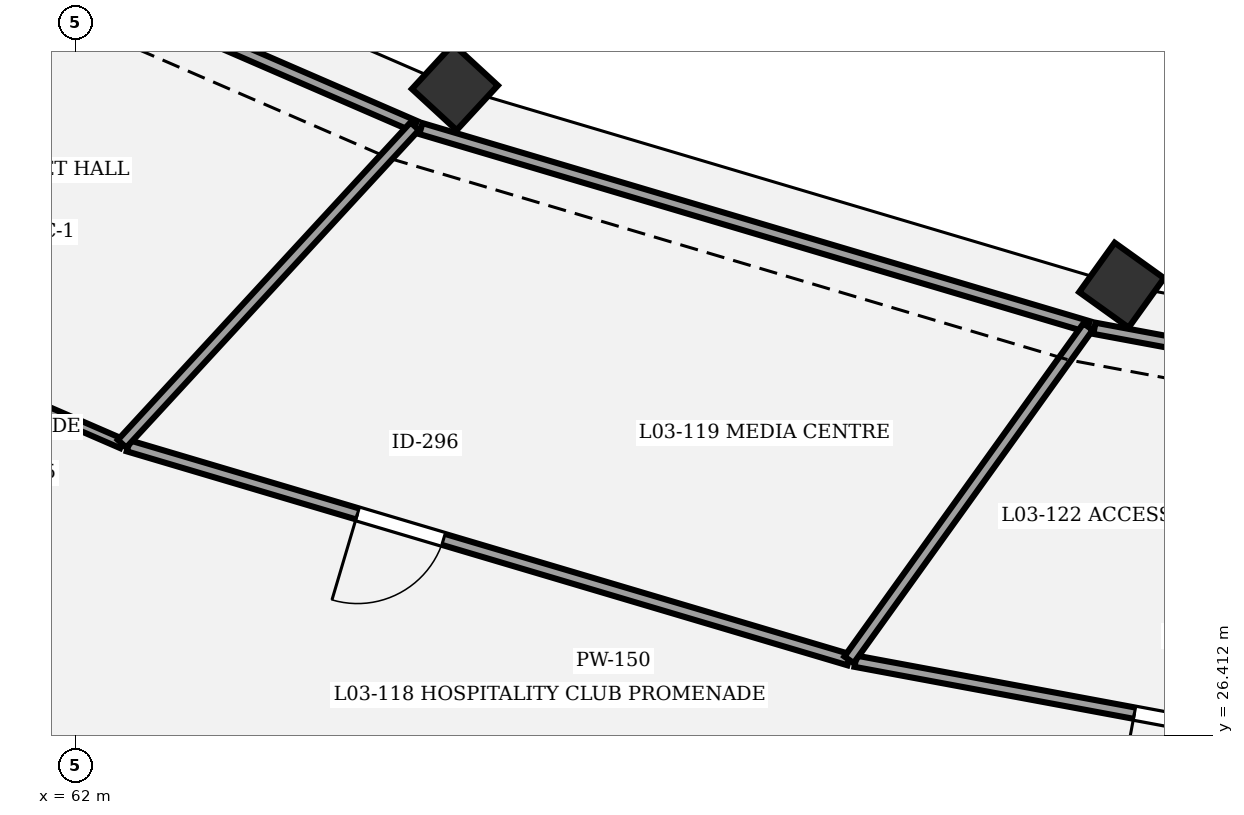
"""IFC4 building model, lengths in metres.
Left out: names, types, materials, properties, quantities, classifications, styles, units other than length and angle.
Written with IfcOpenShell. Run it as: python <this file> out.ifc"""

import sys

from ifc_helpers import new_model, si_unit, direction, frame, frame_2d, origin, origin_2d, place, context, subcontext, project, spatial, rectangle, extrude, element, fill, save


model = new_model("IFC4")
c1 = context("Model", 3, precision=1e-05, world=origin(), true_north=direction((0.0, 1.0)))
c2 = subcontext(c1, "Body", "Model", "MODEL_VIEW")
j1 = project(units=[si_unit("LENGTHUNIT", "METRE"), si_unit("PLANEANGLEUNIT", "RADIAN")], contexts=[c1])
p1 = place(None, origin())
s1 = spatial("IfcSite", under=j1, at=p1, CompositionType="ELEMENT")
p2 = place(p1, origin())
s2 = spatial("IfcBuilding", under=s1, at=p2, CompositionType="ELEMENT")
p3 = place(p2, frame((0.0, 0.0, 14.7)))
s3 = spatial("IfcBuildingStorey", under=s2, at=p3, CompositionType="ELEMENT", Elevation=14.7)
for number, where, z_axis, x_axis in (
    (1, (66.997, 34.938, 0.0), (0.0, 0.0, 1.0), (-0.678, -0.735, 0.0)),
    (2, (75.77, 32.333, 0.0), (0.0, 0.0, 1.0), (-0.583, -0.812, 0.0)),
):
    element("IfcColumn", number, at=place(p3, frame(where, z_axis=z_axis, x_axis=x_axis)), inside=s3, PredefinedType="COLUMN", context=c2, shape_type="SweptSolid", body=[
        extrude(rectangle(XDim=0.8, YDim=0.8, at=origin_2d()), origin(), (0.0, 0.0, 1.0), 2.85),
    ])
p4 = place(p3, frame((62.618, 30.247, 0.0), z_axis=(0.0, 0.0, 1.0), x_axis=(-0.917494590455, 0.397748257677, 0.0)))
e3 = element("IfcWall", 3, at=p4, inside=s3, PredefinedType="PARTITIONING", context=c2, shape_type="SweptSolid", body=[
    extrude(rectangle(XDim=9.049, YDim=0.125, at=frame_2d((4.525, 0.0))), origin(), (0.0, 0.0, 1.0), 3.25),
])
p5 = place(p4, frame((6.167, 0.0, 0.0)))
e4 = element("IfcOpeningElement", 4, at=p5, cuts=e3, PredefinedType="OPENING", context=c2, shape_type="SweptSolid", body=[
    extrude(rectangle(XDim=1.1, YDim=2.1, at=frame_2d((0.55, 1.05))), frame((0.0, 0.073, 0.0), z_axis=(0.0, -1.0, 0.0), x_axis=(1.0, 0.0, 0.0)), (0.0, 0.0, 1.0), 0.145),
])
p6 = place(p3, frame((72.183, 27.404, 0.0), z_axis=(0.0, 0.0, 1.0), x_axis=(-0.958655809656, 0.284568161629, 0.0)))
e5 = element("IfcWall", 5, at=p6, inside=s3, PredefinedType="PARTITIONING", context=c2, shape_type="SweptSolid", body=[
    extrude(rectangle(XDim=9.891, YDim=0.15, at=frame_2d((4.946, 0.0))), origin(), (0.0, 0.0, 1.0), 3.25),
])
p7 = place(p6, frame((5.566, 0.0, 0.0)))
e6 = element("IfcOpeningElement", 6, at=p7, cuts=e5, PredefinedType="OPENING", context=c2, shape_type="SweptSolid", body=[
    extrude(rectangle(XDim=1.18, YDim=2.1, at=frame_2d((0.59, 1.05))), frame((0.0, 0.085, 0.0), z_axis=(0.0, -1.0, 0.0), x_axis=(1.0, 0.0, 0.0)), (0.0, 0.0, 1.0), 0.17),
])
p8 = place(p3, frame((59.134, 26.35, 0.0), z_axis=(0.0, 0.0, 1.0), x_axis=(0.958661401763, -0.284549322211, 0.0)))
e7 = element("IfcWall", 7, at=p8, inside=s3, PredefinedType="PARTITIONING", context=c2, shape_type="SweptSolid", body=[
    extrude(rectangle(XDim=9.809, YDim=0.125, at=frame_2d((4.904, 0.0))), origin(), (0.0, 0.0, 1.0), 3.25),
])
p9 = place(p8, frame((5.487, 0.0, 0.0)))
e8 = element("IfcOpeningElement", 8, at=p9, cuts=e7, PredefinedType="OPENING", context=c2, shape_type="SweptSolid", body=[
    extrude(rectangle(XDim=1.22, YDim=2.1, at=frame_2d((0.61, 1.05))), frame((0.0, 0.073, 0.0), z_axis=(0.0, -1.0, 0.0), x_axis=(1.0, 0.0, 0.0)), (0.0, 0.0, 1.0), 0.145),
])
p10 = place(p3, frame((77.669, 26.38, 0.0), z_axis=(0.0, 0.0, 1.0), x_axis=(-0.983092857309, 0.183107711217, 0.0)))
e9 = element("IfcWall", 9, at=p10, inside=s3, PredefinedType="PARTITIONING", context=c2, shape_type="SweptSolid", body=[
    extrude(rectangle(XDim=5.493, YDim=0.15, at=frame_2d((2.747, 0.0))), origin(), (0.0, 0.0, 1.0), 3.25),
])
p11 = place(p10, frame((0.5, 0.0, 0.0)))
e10 = element("IfcOpeningElement", 10, at=p11, cuts=e9, PredefinedType="OPENING", context=c2, shape_type="SweptSolid", body=[
    extrude(rectangle(XDim=1.26, YDim=2.1, at=frame_2d((0.63, 1.05))), frame((0.0, 0.085, 0.0), z_axis=(0.0, -1.0, 0.0), x_axis=(1.0, 0.0, 0.0)), (0.0, 0.0, 1.0), 0.17),
])
p12 = place(p3, frame((58.784, 37.756, 0.0), z_axis=(0.0, 0.0, 1.0), x_axis=(0.917493946853, -0.397749742286, 0.0)))
e11 = element("IfcWall", 11, at=p12, inside=s3, PredefinedType="PARTITIONING", context=c2, shape_type="SweptSolid", body=[
    extrude(rectangle(XDim=8.377, YDim=0.15, at=frame_2d((4.188, 0.0))), origin(), (0.0, 0.0, 1.0), 3.25),
])
p13 = place(p3, frame((66.47, 34.424, 0.0), z_axis=(0.0, 0.0, 1.0), x_axis=(-0.677867773629, -0.735183841958, 0.0)))
e12 = element("IfcWall", 12, at=p13, inside=s3, PredefinedType="PARTITIONING", context=c2, shape_type="SweptSolid", body=[
    extrude(rectangle(XDim=5.682, YDim=0.15, at=frame_2d((2.841, 0.0))), origin(), (0.0, 0.0, 1.0), 3.25),
])
p14 = place(p3, frame((66.55, 34.393, 0.0), z_axis=(0.0, 0.0, 1.0), x_axis=(0.958661639872, -0.284548520005, 0.0)))
e13 = element("IfcWall", 13, at=p14, inside=s3, PredefinedType="PARTITIONING", context=c2, shape_type="SweptSolid", body=[
    extrude(rectangle(XDim=9.157, YDim=0.15, at=frame_2d((4.579, 0.0))), origin(), (0.0, 0.0, 1.0), 3.25),
])
p15 = place(p3, frame((75.329, 31.788, 0.0), z_axis=(0.0, 0.0, 1.0), x_axis=(-0.582996203878, -0.812474877313, 0.0)))
e14 = element("IfcWall", 14, at=p15, inside=s3, PredefinedType="PARTITIONING", context=c2, shape_type="SweptSolid", body=[
    extrude(rectangle(XDim=5.395, YDim=0.15, at=frame_2d((2.698, 0.0))), origin(), (0.0, 0.0, 1.0), 3.25),
])
p16 = place(p3, frame((75.412, 31.766, 0.0), z_axis=(0.0, 0.0, 1.0), x_axis=(0.98309178423, -0.183113472412, 0.0)))
e15 = element("IfcWall", 15, at=p16, inside=s3, PredefinedType="PARTITIONING", context=c2, shape_type="SweptSolid", body=[
    extrude(rectangle(XDim=2.296, YDim=0.15, at=frame_2d((1.148, 0.0))), origin(), (0.0, 0.0, 1.0), 3.25),
])
p17 = place(p7, origin())
e16 = element("IfcDoor", 16, at=p17, inside=s3, OperationType="SINGLE_SWING_RIGHT", PredefinedType="DOOR", context=c2, shape_type="SweptSolid", body=[
    extrude(rectangle(XDim=1.18, YDim=2.1, at=frame_2d((0.59, 1.05))), frame((0.0, 0.025, 0.0), z_axis=(0.0, -1.0, 0.0), x_axis=(1.0, 0.0, 0.0)), (0.0, 0.0, 1.0), 0.05),
])
fill(e6, e16)
p18 = place(p11, origin())
e17 = element("IfcDoor", 17, at=p18, inside=s3, OperationType="SINGLE_SWING_RIGHT", PredefinedType="DOOR", context=c2, shape_type="SweptSolid", body=[
    extrude(rectangle(XDim=1.26, YDim=2.1, at=frame_2d((0.63, 1.05))), frame((0.0, 0.025, 0.0), z_axis=(0.0, -1.0, 0.0), x_axis=(1.0, 0.0, 0.0)), (0.0, 0.0, 1.0), 0.05),
])
fill(e10, e17)
save(model, sys.argv[1])
